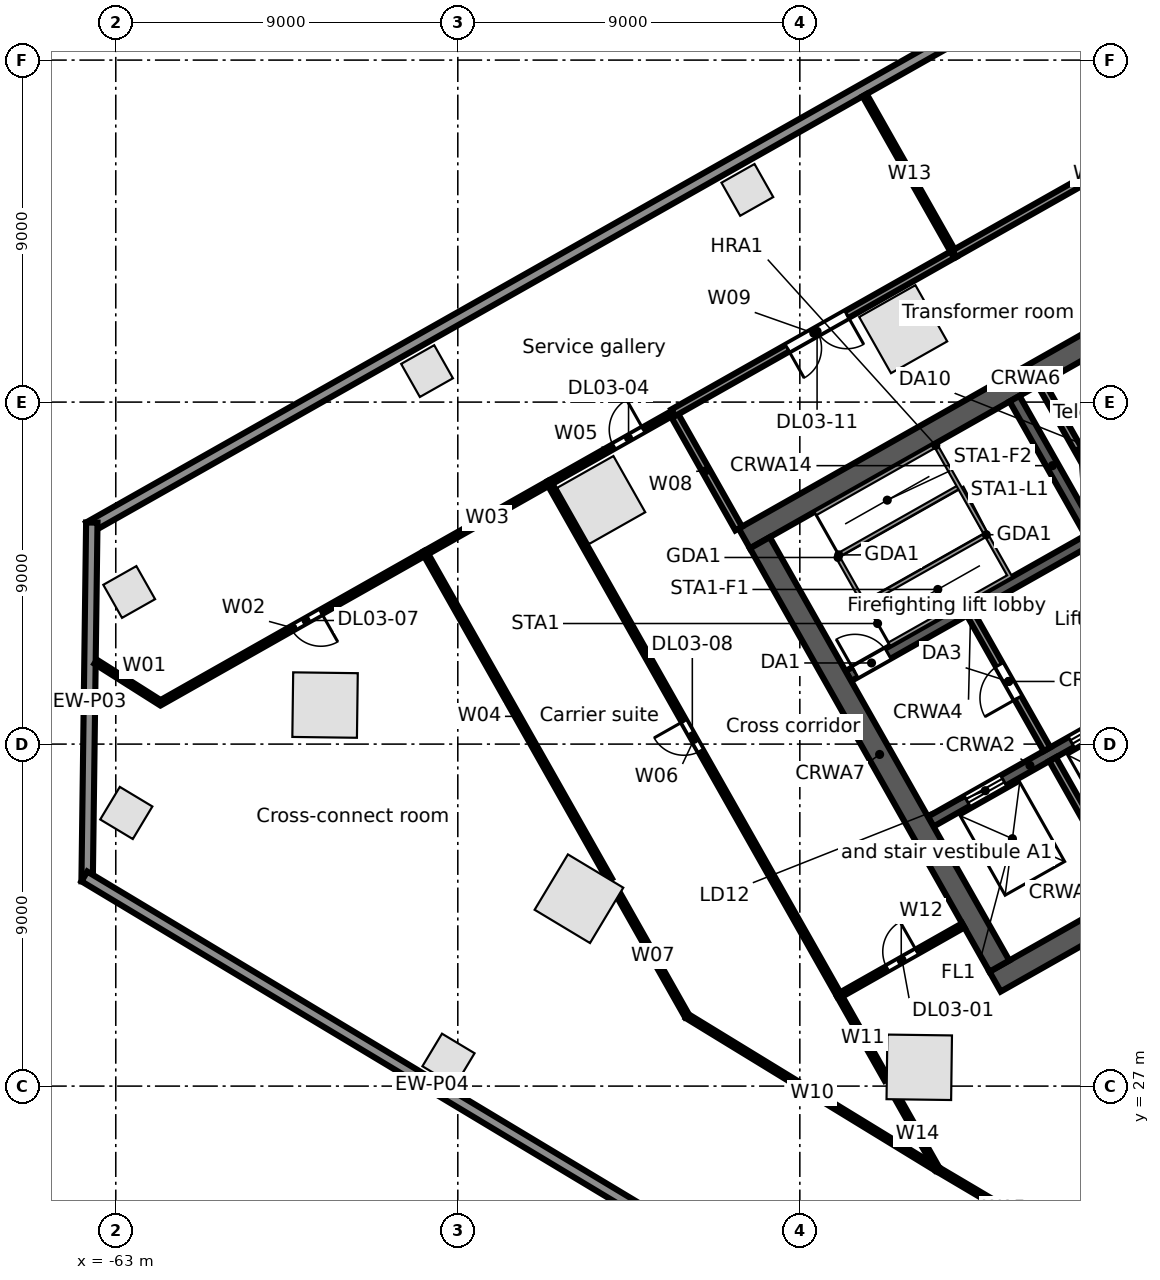
"""IFC4 building model, lengths in metres.
Left out: names, types, materials, properties, quantities, classifications, styles, units other than length and angle.
Written with IfcOpenShell. Run it as: python <this file> out.ifc"""

import sys

from ifc_helpers import new_model, si_unit, direction, frame, frame_2d, origin, origin_2d, place, context, subcontext, project, spatial, rectangle, extrude, element, fill, save


model = new_model("IFC4")
c1 = context("Model", 3, precision=1e-05, world=origin(), true_north=direction((0.0, 1.0)))
c2 = subcontext(c1, "Body", "Model", "MODEL_VIEW")
j1 = project(units=[si_unit("LENGTHUNIT", "METRE"), si_unit("PLANEANGLEUNIT", "RADIAN")], contexts=[c1])
p1 = place(None, origin())
s1 = spatial("IfcSite", under=j1, at=p1, CompositionType="ELEMENT")
p2 = place(p1, origin())
s2 = spatial("IfcBuilding", under=s1, at=p2, CompositionType="ELEMENT")
p3 = place(p2, frame((0.0, 0.0, 16.5)))
s3 = spatial("IfcBuildingStorey", under=s2, at=p3, CompositionType="ELEMENT", Elevation=16.5)
for number, where, z_axis, x_axis in (
    (1, (-42.28, 46.919, 0.0), (0.0, 0.0, 1.0), (-0.87, -0.492, 0.0)),
    (2, (-50.226, 42.423, 0.0), (0.0, 0.0, 1.0), (-0.87, -0.492, 0.0)),
    (3, (-57.493, 37.027, 0.0), (0.0, 0.0, 1.0), (-0.013, -1.0, 0.0)),
    (4, (-50.812, 31.931, 0.0), (0.0, 0.0, 1.0), (0.857, -0.515, 0.0)),
    (5, (-41.858, 27.495, 0.0), (0.0, 0.0, 1.0), (1.0, -0.013, 0.0)),
):
    element("IfcColumn", number, at=place(p3, frame(where, z_axis=z_axis, x_axis=x_axis)), inside=s3, PredefinedType="COLUMN", context=c2, shape_type="SweptSolid", body=[
        extrude(rectangle(XDim=1.7, YDim=1.7, at=origin_2d()), origin(), (0.0, 0.0, 1.0), 5.0),
    ])
for number, where, z_axis, x_axis in (
    (6, (-46.381, 50.584, 0.0), (0.0, 0.0, 1.0), (-0.87, -0.492, 0.0)),
    (7, (-54.81, 45.816, 0.0), (0.0, 0.0, 1.0), (-0.87, -0.492, 0.0)),
    (8, (-62.647, 40.003, 0.0), (0.0, 0.0, 1.0), (-0.87, -0.492, 0.0)),
    (9, (-62.723, 34.188, 0.0), (0.0, 0.0, 1.0), (0.857, -0.515, 0.0)),
    (10, (-54.245, 27.694, 0.0), (0.0, 0.0, 1.0), (0.857, -0.515, 0.0)),
):
    element("IfcColumn", number, at=place(p3, frame(where, z_axis=z_axis, x_axis=x_axis)), inside=s3, PredefinedType="COLUMN", context=c2, shape_type="SweptSolid", body=[
        extrude(rectangle(XDim=1.0, YDim=1.0, at=origin_2d()), origin(), (0.0, 0.0, 1.0), 5.0),
    ])
p4 = place(p3, frame((-63.707, 41.701, 0.0), z_axis=(0.0, 0.0, 1.0), x_axis=(0.870355510268, 0.492423888277, 0.0)))
e11 = element("IfcWall", 11, at=p4, inside=s3, PredefinedType="STANDARD", context=c2, shape_type="SweptSolid", body=[
    extrude(rectangle(XDim=67.903, YDim=0.3, at=frame_2d((33.952, 0.0))), origin(), (0.0, 0.0, 1.0), 4.65),
])
p5 = place(p3, frame((-63.754, 32.387, 0.0), z_axis=(0.0, 0.0, 1.0), x_axis=(0.013081929375, 0.999914427901, 0.0)))
e12 = element("IfcWall", 12, at=p5, inside=s3, PredefinedType="STANDARD", context=c2, shape_type="SweptSolid", body=[
    extrude(rectangle(XDim=9.443, YDim=0.3, at=frame_2d((4.722, 0.0))), origin(), (0.0, 0.0, 1.0), 4.65),
])
p6 = place(p3, frame((-45.526, 21.522, 0.0), z_axis=(0.0, 0.0, 1.0), x_axis=(-0.857164837164, 0.515042174903, 0.0)))
e13 = element("IfcWall", 13, at=p6, inside=s3, PredefinedType="STANDARD", context=c2, shape_type="SweptSolid", body=[
    extrude(rectangle(XDim=21.35, YDim=0.3, at=frame_2d((10.675, 0.0))), origin(), (0.0, 0.0, 1.0), 4.65),
])
p7 = place(p3, frame((-39.862, 29.749, 0.0), z_axis=(0.0, 0.0, 1.0), x_axis=(0.870350116061, 0.492433422375, 0.0)))
e14 = element("IfcWall", 14, at=p7, inside=s3, PredefinedType="SOLIDWALL", context=c2, shape_type="SweptSolid", body=[
    extrude(rectangle(XDim=17.0, YDim=0.6, at=frame_2d((8.5, 0.0))), origin(), (0.0, 0.0, 1.0), 4.65),
])
p8 = place(p7, frame((7.2, 0.0, 0.0)))
e15 = element("IfcOpeningElement", 15, at=p8, cuts=e14, PredefinedType="OPENING", context=c2, shape_type="SweptSolid", body=[
    extrude(rectangle(XDim=1.2, YDim=2.1, at=frame_2d((0.6, 1.05))), frame((0.0, 0.31, 0.0), z_axis=(0.0, -1.0, 0.0), x_axis=(1.0, 0.0, 0.0)), (0.0, 0.0, 1.0), 0.62),
])
p9 = place(p3, frame((-41.556, 33.961, 0.0), z_axis=(0.0, 0.0, 1.0), x_axis=(0.870343731308, 0.492444706919, 0.0)))
e16 = element("IfcWall", 16, at=p9, inside=s3, PredefinedType="SOLIDWALL", context=c2, shape_type="SweptSolid", body=[
    extrude(rectangle(XDim=6.0, YDim=0.3, at=frame_2d((3.0, 0.0))), origin(), (0.0, 0.0, 1.0), 4.65),
])
p10 = place(p9, frame((1.1, 0.0, 0.0)))
e17 = element("IfcOpeningElement", 17, at=p10, cuts=e16, PredefinedType="OPENING", context=c2, shape_type="SweptSolid", body=[
    extrude(rectangle(XDim=1.1, YDim=2.1, at=frame_2d((0.55, 1.05))), frame((0.0, 0.16, 0.0), z_axis=(0.0, -1.0, 0.0), x_axis=(1.0, 0.0, 0.0)), (0.0, 0.0, 1.0), 0.32),
])
p11 = place(p9, frame((4.25, 0.0, 0.0)))
e18 = element("IfcOpeningElement", 18, at=p11, cuts=e16, PredefinedType="OPENING", context=c2, shape_type="SweptSolid", body=[
    extrude(rectangle(XDim=1.1, YDim=2.1, at=frame_2d((0.55, 1.05))), frame((0.0, 0.16, 0.0), z_axis=(0.0, -1.0, 0.0), x_axis=(1.0, 0.0, 0.0)), (0.0, 0.0, 1.0), 0.32),
])
p12 = place(p3, frame((-43.723, 37.791, 0.0), z_axis=(0.0, 0.0, 1.0), x_axis=(0.87035077051, 0.49243226567, 0.0)))
e19 = element("IfcWall", 19, at=p12, inside=s3, PredefinedType="SOLIDWALL", context=c2, shape_type="SweptSolid", body=[
    extrude(rectangle(XDim=7.4, YDim=0.3, at=frame_2d((3.7, 0.0))), origin(), (0.0, 0.0, 1.0), 4.65),
])
p13 = place(p12, frame((0.2, 0.0, 0.0)))
e20 = element("IfcOpeningElement", 20, at=p13, cuts=e19, PredefinedType="OPENING", context=c2, shape_type="SweptSolid", body=[
    extrude(rectangle(XDim=1.0, YDim=2.1, at=frame_2d((0.5, 1.05))), frame((0.0, 0.16, 0.0), z_axis=(0.0, -1.0, 0.0), x_axis=(1.0, 0.0, 0.0)), (0.0, 0.0, 1.0), 0.32),
])
p14 = place(p3, frame((-46.461, 41.412, 0.0), z_axis=(0.0, 0.0, 1.0), x_axis=(0.870350116061, 0.492433422375, 0.0)))
e21 = element("IfcWall", 21, at=p14, inside=s3, PredefinedType="SOLIDWALL", context=c2, shape_type="SweptSolid", body=[
    extrude(rectangle(XDim=17.0, YDim=0.6, at=frame_2d((8.5, 0.0))), origin(), (0.0, 0.0, 1.0), 4.65),
])
p15 = place(p3, frame((-46.052, 41.298, 0.0), z_axis=(0.0, 0.0, 1.0), x_axis=(0.492418598281, -0.870358503186, 0.0)))
e22 = element("IfcWall", 22, at=p15, inside=s3, PredefinedType="SOLIDWALL", context=c2, shape_type="SweptSolid", body=[
    extrude(rectangle(XDim=12.8, YDim=0.6, at=frame_2d((6.4, 0.0))), origin(), (0.0, 0.0, 1.0), 4.65),
])
p16 = place(p3, frame((-38.349, 35.603, 0.0), z_axis=(0.0, 0.0, 1.0), x_axis=(0.49241474071, -0.870360685654, 0.0)))
e23 = element("IfcWall", 23, at=p16, inside=s3, PredefinedType="SOLIDWALL", context=c2, shape_type="SweptSolid", body=[
    extrude(rectangle(XDim=4.05, YDim=0.2, at=frame_2d((2.025, 0.0))), origin(), (0.0, 0.0, 1.0), 4.65),
])
p17 = place(p3, frame((-40.516, 39.433, 0.0), z_axis=(0.0, 0.0, 1.0), x_axis=(0.492453559952, -0.87033872216, 0.0)))
e24 = element("IfcWall", 24, at=p17, inside=s3, PredefinedType="PARTITIONING", context=c2, shape_type="SweptSolid", body=[
    extrude(rectangle(XDim=4.1, YDim=0.2, at=frame_2d((2.05, 0.0))), origin(), (0.0, 0.0, 1.0), 4.65),
])
p18 = place(p17, frame((1.55, 0.0, 0.0)))
e25 = element("IfcOpeningElement", 25, at=p18, cuts=e24, PredefinedType="OPENING", context=c2, shape_type="SweptSolid", body=[
    extrude(rectangle(XDim=1.0, YDim=2.1, at=frame_2d((0.5, 1.05))), frame((0.0, 0.11, 0.0), z_axis=(0.0, -1.0, 0.0), x_axis=(1.0, 0.0, 0.0)), (0.0, 0.0, 1.0), 0.22),
])
p19 = place(p3, frame((-39.35, 45.09, 0.0), z_axis=(0.0, 0.0, 1.0), x_axis=(0.49241474071, -0.870360685654, 0.0)))
e26 = element("IfcWall", 26, at=p19, inside=s3, PredefinedType="SOLIDWALL", context=c2, shape_type="SweptSolid", body=[
    extrude(rectangle(XDim=4.05, YDim=0.3, at=frame_2d((2.025, 0.0))), origin(), (0.0, 0.0, 1.0), 4.65),
])
p20 = place(p3, frame((-38.654, 45.484, 0.0), z_axis=(0.0, 0.0, 1.0), x_axis=(0.492440575896, -0.870346068648, 0.0)))
e27 = element("IfcWall", 27, at=p20, inside=s3, PredefinedType="SOLIDWALL", context=c2, shape_type="SweptSolid", body=[
    extrude(rectangle(XDim=4.05, YDim=0.2, at=frame_2d((2.025, 0.0))), origin(), (0.0, 0.0, 1.0), 4.65),
])
p21 = place(p3, frame((-63.529, 38.167, 0.0), z_axis=(0.0, 0.0, 1.0), x_axis=(0.844913795328, -0.534902494352, 0.0)))
e28 = element("IfcWall", 28, at=p21, inside=s3, PredefinedType="PARTITIONING", context=c2, shape_type="SweptSolid", body=[
    extrude(rectangle(XDim=2.019, YDim=0.125, at=frame_2d((1.01, 0.0))), origin(), (0.0, 0.0, 1.0), 4.13),
])
p22 = place(p3, frame((-61.823, 37.087, 0.0), z_axis=(0.0, 0.0, 1.0), x_axis=(0.870379756599, 0.492381030609, 0.0)))
e29 = element("IfcWall", 29, at=p22, inside=s3, PredefinedType="PARTITIONING", context=c2, shape_type="SweptSolid", body=[
    extrude(rectangle(XDim=8.0, YDim=0.125, at=frame_2d((4.0, 0.0))), origin(), (0.0, 0.0, 1.0), 3.83),
])
p23 = place(p22, frame((3.95, 0.0, 0.0)))
e30 = element("IfcOpeningElement", 30, at=p23, cuts=e29, PredefinedType="OPENING", context=c2, shape_type="SweptSolid", body=[
    extrude(rectangle(XDim=0.9, YDim=2.1, at=frame_2d((0.45, 1.05))), frame((0.0, 0.073, 0.0), z_axis=(0.0, -1.0, 0.0), x_axis=(1.0, 0.0, 0.0)), (0.0, 0.0, 1.0), 0.145),
])
p24 = place(p3, frame((-54.86, 41.026, 0.0), z_axis=(0.0, 0.0, 1.0), x_axis=(0.870310553999, 0.492503339682, 0.0)))
e31 = element("IfcWall", 31, at=p24, inside=s3, PredefinedType="PARTITIONING", context=c2, shape_type="SweptSolid", body=[
    extrude(rectangle(XDim=3.75, YDim=0.125, at=frame_2d((1.875, 0.0))), origin(), (0.0, 0.0, 1.0), 4.024),
])
p25 = place(p3, frame((-54.86, 41.026, 0.0), z_axis=(0.0, 0.0, 1.0), x_axis=(0.492429637412, -0.870352257536, 0.0)))
e32 = element("IfcWall", 32, at=p25, inside=s3, PredefinedType="PARTITIONING", context=c2, shape_type="SweptSolid", body=[
    extrude(rectangle(XDim=9.872, YDim=0.125, at=frame_2d((4.936, 0.0))), origin(), (0.0, 0.0, 1.0), 3.712),
])
p26 = place(p3, frame((-51.596, 42.873, 0.0), z_axis=(0.0, 0.0, 1.0), x_axis=(0.87043427122, 0.492284652905, 0.0)))
e33 = element("IfcWall", 33, at=p26, inside=s3, PredefinedType="PARTITIONING", context=c2, shape_type="SweptSolid", body=[
    extrude(rectangle(XDim=3.75, YDim=0.125, at=frame_2d((1.875, 0.0))), origin(), (0.0, 0.0, 1.0), 4.65),
])
p27 = place(p26, frame((1.95, 0.0, 0.0)))
e34 = element("IfcOpeningElement", 34, at=p27, cuts=e33, PredefinedType="OPENING", context=c2, shape_type="SweptSolid", body=[
    extrude(rectangle(XDim=0.9, YDim=2.1, at=frame_2d((0.45, 1.05))), frame((0.0, 0.073, 0.0), z_axis=(0.0, -1.0, 0.0), x_axis=(1.0, 0.0, 0.0)), (0.0, 0.0, 1.0), 0.145),
])
p28 = place(p3, frame((-51.596, 42.873, 0.0), z_axis=(0.0, 0.0, 1.0), x_axis=(0.492435038471, -0.870349201692, 0.0)))
e35 = element("IfcWall", 35, at=p28, inside=s3, PredefinedType="PARTITIONING", context=c2, shape_type="SweptSolid", body=[
    extrude(rectangle(XDim=15.501, YDim=0.125, at=frame_2d((7.75, 0.0))), origin(), (0.0, 0.0, 1.0), 3.712),
])
p29 = place(p28, frame((7.2, 0.0, 0.0)))
e36 = element("IfcOpeningElement", 36, at=p29, cuts=e35, PredefinedType="OPENING", context=c2, shape_type="SweptSolid", body=[
    extrude(rectangle(XDim=0.9, YDim=2.1, at=frame_2d((0.45, 1.05))), frame((0.0, 0.073, 0.0), z_axis=(0.0, -1.0, 0.0), x_axis=(1.0, 0.0, 0.0)), (0.0, 0.0, 1.0), 0.145),
])
p30 = place(p3, frame((-49.766, 32.022, 0.0), z_axis=(0.0, 0.0, 1.0), x_axis=(0.492501810842, -0.870311419159, 0.0)))
e37 = element("IfcWall", 37, at=p30, inside=s3, PredefinedType="PARTITIONING", context=c2, shape_type="SweptSolid", body=[
    extrude(rectangle(XDim=3.655, YDim=0.125, at=frame_2d((1.828, 0.0))), origin(), (0.0, 0.0, 1.0), 3.93),
])
p31 = place(p3, frame((-48.332, 44.719, 0.0), z_axis=(0.0, 0.0, 1.0), x_axis=(0.492392845909, -0.87037307248, 0.0)))
e38 = element("IfcWall", 38, at=p31, inside=s3, PredefinedType="PARTITIONING", context=c2, shape_type="SweptSolid", body=[
    extrude(rectangle(XDim=3.5, YDim=0.2, at=frame_2d((1.75, 0.0))), origin(), (0.0, 0.0, 1.0), 3.93),
])
p32 = place(p3, frame((-48.332, 44.719, 0.0), z_axis=(0.0, 0.0, 1.0), x_axis=(0.870331650579, 0.492466057713, 0.0)))
e39 = element("IfcWall", 39, at=p32, inside=s3, PredefinedType="PARTITIONING", context=c2, shape_type="SweptSolid", body=[
    extrude(rectangle(XDim=8.5, YDim=0.2, at=frame_2d((4.25, 0.0))), origin(), (0.0, 0.0, 1.0), 4.03),
])
p33 = place(p32, frame((3.45, 0.0, 0.0)))
e40 = element("IfcOpeningElement", 40, at=p33, cuts=e39, PredefinedType="OPENING", context=c2, shape_type="SweptSolid", body=[
    extrude(rectangle(XDim=1.8, YDim=2.1, at=frame_2d((0.9, 1.05))), frame((0.0, 0.11, 0.0), z_axis=(0.0, -1.0, 0.0), x_axis=(1.0, 0.0, 0.0)), (0.0, 0.0, 1.0), 0.22),
])
p34 = place(p3, frame((-47.966, 28.841, 0.0), z_axis=(0.0, 0.0, 1.0), x_axis=(0.8531669284, -0.521637989686, 0.0)))
e41 = element("IfcWall", 41, at=p34, inside=s3, PredefinedType="PARTITIONING", context=c2, shape_type="SweptSolid", body=[
    extrude(rectangle(XDim=7.722, YDim=0.125, at=frame_2d((3.861, 0.0))), origin(), (0.0, 0.0, 1.0), 3.93),
])
p35 = place(p3, frame((-43.963, 29.382, 0.0), z_axis=(0.0, 0.0, 1.0), x_axis=(0.492408705769, -0.870364099951, 0.0)))
e42 = element("IfcWall", 42, at=p35, inside=s3, PredefinedType="PARTITIONING", context=c2, shape_type="SweptSolid", body=[
    extrude(rectangle(XDim=2.541, YDim=0.125, at=frame_2d((1.27, 0.0))), origin(), (0.0, 0.0, 1.0), 3.93),
])
p36 = place(p3, frame((-43.963, 29.382, 0.0), z_axis=(0.0, 0.0, 1.0), x_axis=(0.870259488443, 0.492593567533, 0.0)))
e43 = element("IfcWall", 43, at=p36, inside=s3, PredefinedType="PARTITIONING", context=c2, shape_type="SweptSolid", body=[
    extrude(rectangle(XDim=3.749, YDim=0.125, at=frame_2d((1.875, 0.0))), origin(), (0.0, 0.0, 1.0), 4.024),
])
p37 = place(p36, frame((1.45, 0.0, 0.0)))
e44 = element("IfcOpeningElement", 44, at=p37, cuts=e43, PredefinedType="OPENING", context=c2, shape_type="SweptSolid", body=[
    extrude(rectangle(XDim=0.9, YDim=2.1, at=frame_2d((0.45, 1.05))), frame((0.0, 0.073, 0.0), z_axis=(0.0, -1.0, 0.0), x_axis=(1.0, 0.0, 0.0)), (0.0, 0.0, 1.0), 0.145),
])
p38 = place(p3, frame((-43.295, 53.077, 0.0), z_axis=(0.0, 0.0, 1.0), x_axis=(0.492503605136, -0.87031040378, 0.0)))
e45 = element("IfcWall", 45, at=p38, inside=s3, PredefinedType="PARTITIONING", context=c2, shape_type="SweptSolid", body=[
    extrude(rectangle(XDim=4.793, YDim=0.125, at=frame_2d((2.397, 0.0))), origin(), (0.0, 0.0, 1.0), 3.93),
])
p39 = place(p3, frame((-42.418, 26.652, 0.0), z_axis=(0.0, 0.0, 1.0), x_axis=(0.492251431349, -0.870453059237, 0.0)))
e46 = element("IfcWall", 46, at=p39, inside=s3, PredefinedType="PARTITIONING", context=c2, shape_type="SweptSolid", body=[
    extrude(rectangle(XDim=2.113, YDim=0.125, at=frame_2d((1.056, 0.0))), origin(), (0.0, 0.0, 1.0), 4.65),
])
p40 = place(p3, frame((-41.378, 24.813, 0.0), z_axis=(0.0, 0.0, 1.0), x_axis=(0.860752907168, -0.509023017948, 0.0)))
e47 = element("IfcWall", 47, at=p40, inside=s3, PredefinedType="PARTITIONING", context=c2, shape_type="SweptSolid", body=[
    extrude(rectangle(XDim=4.088, YDim=0.125, at=frame_2d((2.044, 0.0))), origin(), (0.0, 0.0, 1.0), 4.65),
])
p41 = place(p3, frame((-40.934, 48.905, 0.0), z_axis=(0.0, 0.0, 1.0), x_axis=(0.870387854278, 0.492366716102, 0.0)))
e48 = element("IfcWall", 48, at=p41, inside=s3, PredefinedType="PARTITIONING", context=c2, shape_type="SweptSolid", body=[
    extrude(rectangle(XDim=8.5, YDim=0.2, at=frame_2d((4.25, 0.0))), origin(), (0.0, 0.0, 1.0), 4.03),
])
p42 = place(p10, origin())
e49 = element("IfcDoor", 49, at=p42, inside=s3, OperationType="DOUBLE_DOOR_SLIDING", PredefinedType="DOOR", context=c2, shape_type="SweptSolid", body=[
    extrude(rectangle(XDim=1.1, YDim=2.1, at=frame_2d((0.55, 1.05))), frame((0.0, 0.025, 0.0), z_axis=(0.0, -1.0, 0.0), x_axis=(1.0, 0.0, 0.0)), (0.0, 0.0, 1.0), 0.05),
])
fill(e17, e49)
p43 = place(p11, origin())
e50 = element("IfcDoor", 50, at=p43, inside=s3, OperationType="DOUBLE_DOOR_SLIDING", PredefinedType="DOOR", context=c2, shape_type="SweptSolid", body=[
    extrude(rectangle(XDim=1.1, YDim=2.1, at=frame_2d((0.55, 1.05))), frame((0.0, 0.025, 0.0), z_axis=(0.0, -1.0, 0.0), x_axis=(1.0, 0.0, 0.0)), (0.0, 0.0, 1.0), 0.05),
])
fill(e18, e50)
p44 = place(p13, origin())
e51 = element("IfcDoor", 51, at=p44, inside=s3, OperationType="SINGLE_SWING_LEFT", PredefinedType="DOOR", context=c2, shape_type="SweptSolid", body=[
    extrude(rectangle(XDim=1.0, YDim=2.1, at=frame_2d((0.5, 1.05))), frame((0.0, 0.025, 0.0), z_axis=(0.0, -1.0, 0.0), x_axis=(1.0, 0.0, 0.0)), (0.0, 0.0, 1.0), 0.05),
])
fill(e20, e51)
p45 = place(p18, frame((1.0, 0.0, 0.0), z_axis=(0.0, 0.0, 1.0), x_axis=(-1.0, 0.0, 0.0)))
e52 = element("IfcDoor", 52, at=p45, inside=s3, OperationType="SINGLE_SWING_LEFT", PredefinedType="DOOR", context=c2, shape_type="SweptSolid", body=[
    extrude(rectangle(XDim=1.0, YDim=2.1, at=frame_2d((0.5, 1.05))), frame((0.0, 0.025, 0.0), z_axis=(0.0, -1.0, 0.0), x_axis=(1.0, 0.0, 0.0)), (0.0, 0.0, 1.0), 0.05),
])
fill(e25, e52)
p46 = place(p37, origin())
e53 = element("IfcDoor", 53, at=p46, inside=s3, OperationType="SINGLE_SWING_RIGHT", PredefinedType="DOOR", context=c2, shape_type="SweptSolid", body=[
    extrude(rectangle(XDim=0.9, YDim=2.1, at=frame_2d((0.45, 1.05))), frame((0.0, 0.025, 0.0), z_axis=(0.0, -1.0, 0.0), x_axis=(1.0, 0.0, 0.0)), (0.0, 0.0, 1.0), 0.05),
])
fill(e44, e53)
p47 = place(p27, origin())
e54 = element("IfcDoor", 54, at=p47, inside=s3, OperationType="SINGLE_SWING_RIGHT", PredefinedType="DOOR", context=c2, shape_type="SweptSolid", body=[
    extrude(rectangle(XDim=0.9, YDim=2.1, at=frame_2d((0.45, 1.05))), frame((0.0, 0.025, 0.0), z_axis=(0.0, -1.0, 0.0), x_axis=(1.0, 0.0, 0.0)), (0.0, 0.0, 1.0), 0.05),
])
fill(e34, e54)
p48 = place(p23, frame((0.9, 0.0, 0.0), z_axis=(0.0, 0.0, 1.0), x_axis=(-1.0, 0.0, 0.0)))
e55 = element("IfcDoor", 55, at=p48, inside=s3, OperationType="SINGLE_SWING_LEFT", PredefinedType="DOOR", context=c2, shape_type="SweptSolid", body=[
    extrude(rectangle(XDim=0.9, YDim=2.1, at=frame_2d((0.45, 1.05))), frame((0.0, 0.025, 0.0), z_axis=(0.0, -1.0, 0.0), x_axis=(1.0, 0.0, 0.0)), (0.0, 0.0, 1.0), 0.05),
])
fill(e30, e55)
p49 = place(p29, frame((0.9, 0.0, 0.0), z_axis=(0.0, 0.0, 1.0), x_axis=(-1.0, 0.0, 0.0)))
e56 = element("IfcDoor", 56, at=p49, inside=s3, OperationType="SINGLE_SWING_RIGHT", PredefinedType="DOOR", context=c2, shape_type="SweptSolid", body=[
    extrude(rectangle(XDim=0.9, YDim=2.1, at=frame_2d((0.45, 1.05))), frame((0.0, 0.025, 0.0), z_axis=(0.0, -1.0, 0.0), x_axis=(1.0, 0.0, 0.0)), (0.0, 0.0, 1.0), 0.05),
])
fill(e36, e56)
p50 = place(p33, frame((1.8, 0.0, 0.0), z_axis=(0.0, 0.0, 1.0), x_axis=(-1.0, 0.0, 0.0)))
e57 = element("IfcDoor", 57, at=p50, inside=s3, OperationType="DOUBLE_DOOR_SINGLE_SWING", PredefinedType="DOOR", context=c2, shape_type="SweptSolid", body=[
    extrude(rectangle(XDim=1.8, YDim=2.1, at=frame_2d((0.9, 1.05))), frame((0.0, 0.025, 0.0), z_axis=(0.0, -1.0, 0.0), x_axis=(1.0, 0.0, 0.0)), (0.0, 0.0, 1.0), 0.05),
])
fill(e40, e57)
save(model, sys.argv[1])
